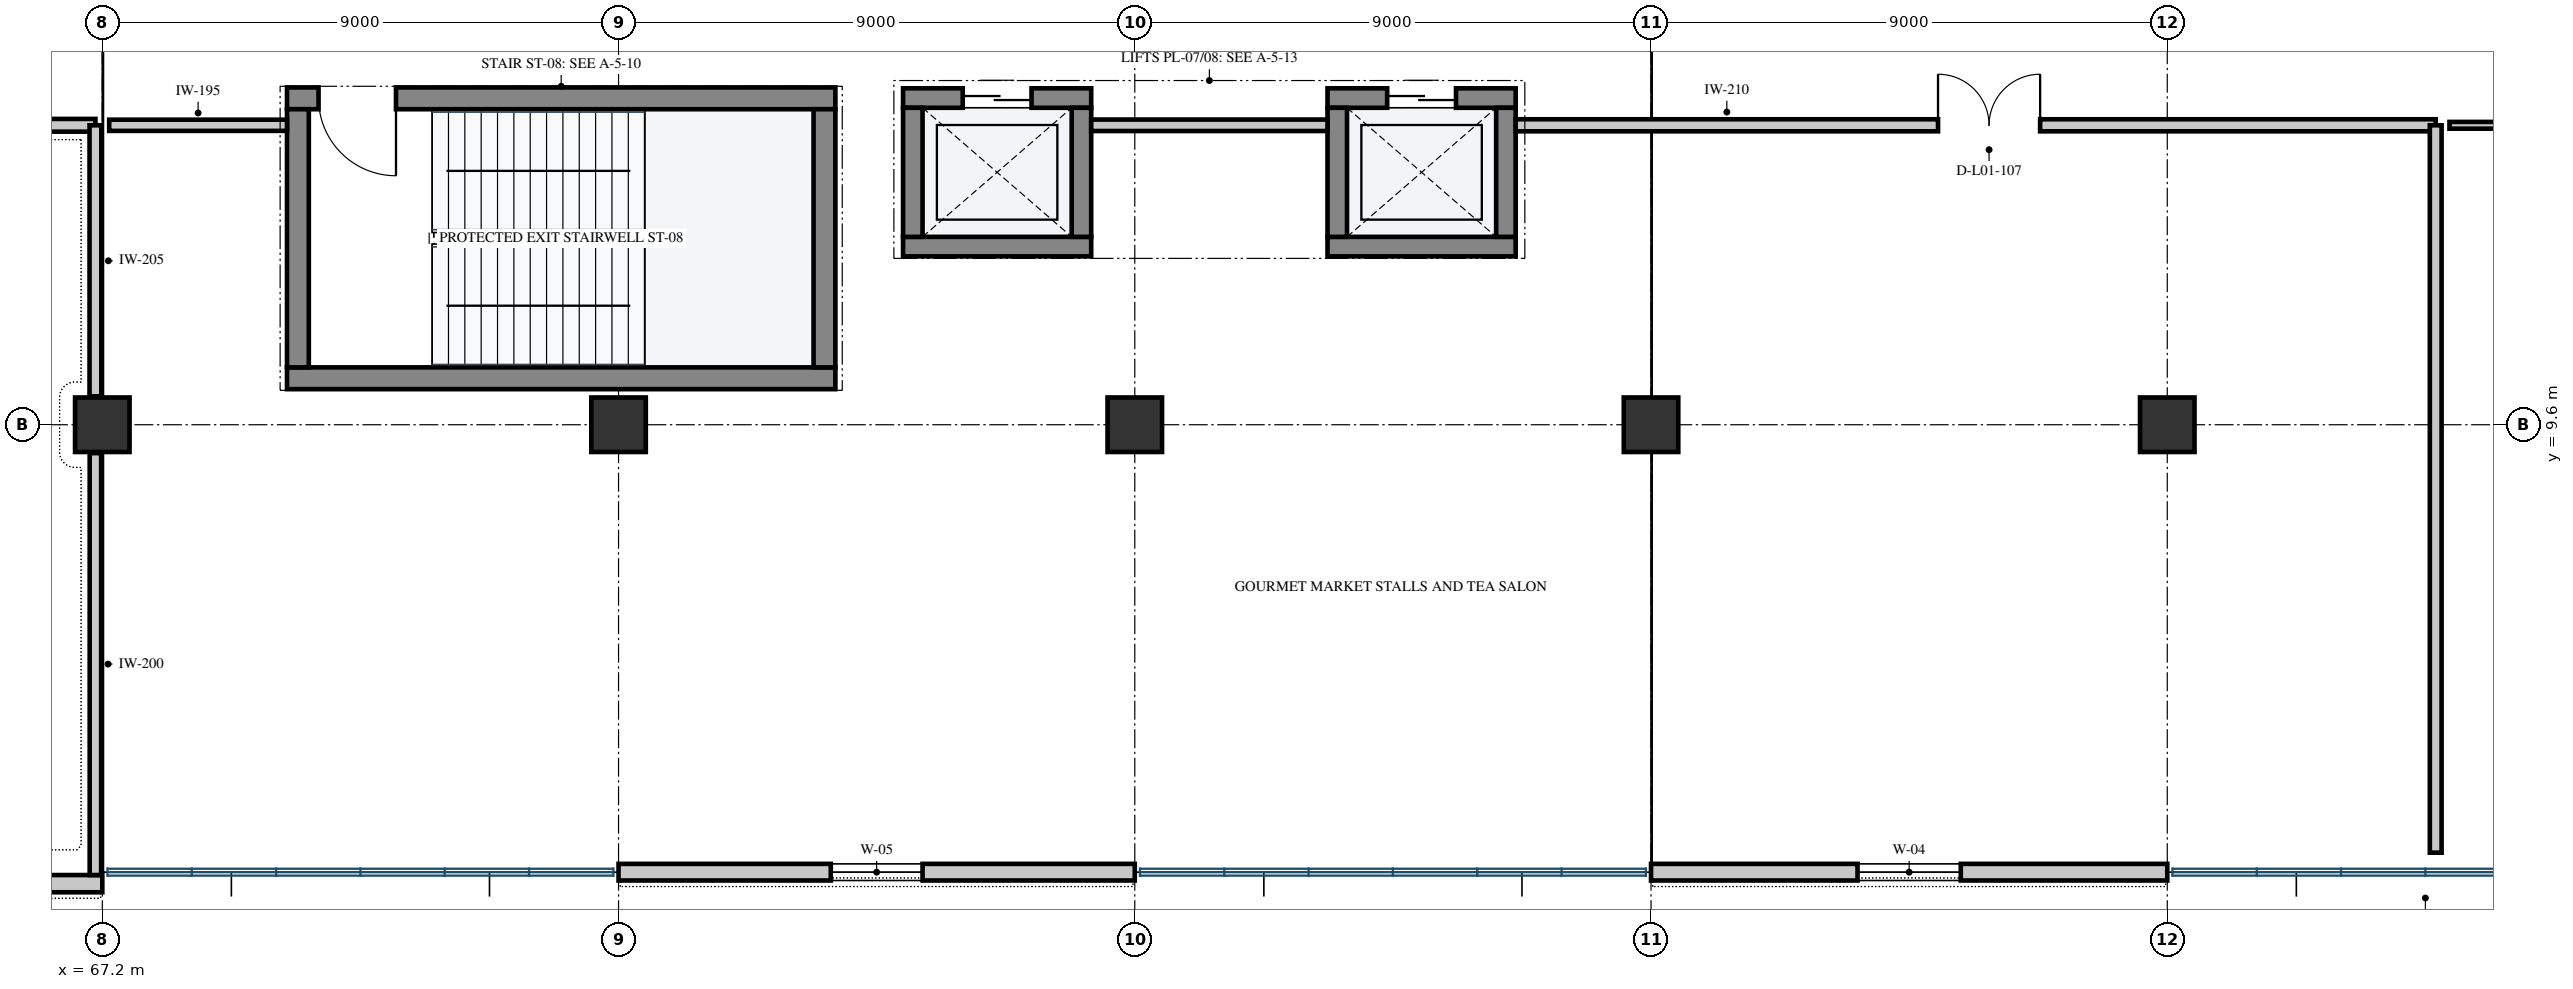
"""IFC4 building model, lengths in metres.
Left out: names, types, materials, properties, quantities, classifications, styles, units other than length and angle.
Written with IfcOpenShell. Run it as: python <this file> out.ifc"""

import sys

from ifc_helpers import new_model, si_unit, direction, frame, frame_2d, origin, origin_2d, place, context, subcontext, project, spatial, rectangle, extrude, element, fill, save


model = new_model("IFC4")
c1 = context("Model", 3, precision=1e-05, world=origin(), true_north=direction((0.0, 1.0)))
c2 = subcontext(c1, "Body", "Model", "MODEL_VIEW")
j1 = project(units=[si_unit("LENGTHUNIT", "METRE"), si_unit("PLANEANGLEUNIT", "RADIAN")], contexts=[c1])
p1 = place(None, origin())
s1 = spatial("IfcSite", under=j1, at=p1, CompositionType="ELEMENT")
p2 = place(p1, origin())
s2 = spatial("IfcBuilding", under=s1, at=p2, CompositionType="ELEMENT")
p3 = place(p2, frame((0.0, 0.0, 5.4)))
s3 = spatial("IfcBuildingStorey", under=s2, at=p3, CompositionType="ELEMENT", Elevation=5.4)
for number, where, z_axis, x_axis in (
    (1, (85.2, 9.6, 0.0), (0.0, 0.0, 1.0), (1.0, 0.0, 0.0)),
    (2, (94.2, 9.6, 0.0), (0.0, 0.0, 1.0), (1.0, 0.0, 0.0)),
    (3, (103.2, 9.6, 0.0), (0.0, 0.0, 1.0), (1.0, 0.0, 0.0)),
    (4, (67.2, 9.6, 0.0), (0.0, 0.0, 1.0), (1.0, 0.0, 0.0)),
    (5, (76.2, 9.6, 0.0), (0.0, 0.0, 1.0), (1.0, 0.0, 0.0)),
):
    element("IfcColumn", number, at=place(p3, frame(where, z_axis=z_axis, x_axis=x_axis)), inside=s3, PredefinedType="COLUMN", context=c2, shape_type="SweptSolid", body=[
        extrude(rectangle(XDim=0.95, YDim=0.95, at=origin_2d()), origin(), (0.0, 0.0, 1.0), 4.8),
    ])
p4 = place(p3, frame((103.2, 1.8, 0.0), z_axis=(0.0, 0.0, 1.0), x_axis=(-1.0, 0.0, 0.0)))
e6 = element("IfcWall", 6, at=p4, inside=s3, PredefinedType="SOLIDWALL", context=c2, shape_type="SweptSolid", body=[
    extrude(rectangle(XDim=9.0, YDim=0.29, at=frame_2d((4.5, 0.0))), origin(), (0.0, 0.0, 1.0), 4.505),
])
p5 = place(p4, frame((3.6, 0.0, 0.95)))
e7 = element("IfcOpeningElement", 7, at=p5, cuts=e6, PredefinedType="OPENING", context=c2, shape_type="SweptSolid", body=[
    extrude(rectangle(XDim=1.8, YDim=2.2, at=frame_2d((0.9, 1.1))), frame((0.0, 0.157, 0.0), z_axis=(0.0, -1.0, 0.0), x_axis=(1.0, 0.0, 0.0)), (0.0, 0.0, 1.0), 0.314),
])
p6 = place(p3, frame((85.2, 1.8, 0.0), z_axis=(0.0, 0.0, 1.0), x_axis=(-1.0, 0.0, 0.0)))
e8 = element("IfcWall", 8, at=p6, inside=s3, PredefinedType="SOLIDWALL", context=c2, shape_type="SweptSolid", body=[
    extrude(rectangle(XDim=9.0, YDim=0.29, at=frame_2d((4.5, 0.0))), origin(), (0.0, 0.0, 1.0), 4.505),
])
p7 = place(p6, frame((3.7, 0.0, 1.0)))
e9 = element("IfcOpeningElement", 9, at=p7, cuts=e8, PredefinedType="OPENING", context=c2, shape_type="SweptSolid", body=[
    extrude(rectangle(XDim=1.6, YDim=2.1, at=frame_2d((0.8, 1.05))), frame((0.0, 0.157, 0.0), z_axis=(0.0, -1.0, 0.0), x_axis=(1.0, 0.0, 0.0)), (0.0, 0.0, 1.0), 0.314),
])
p8 = place(p3, frame((67.2, 1.6, 0.0), z_axis=(0.0, 0.0, 1.0), x_axis=(-1.0, 0.0, 0.0)))
e10 = element("IfcWall", 10, at=p8, inside=s3, PredefinedType="SOLIDWALL", context=c2, shape_type="SweptSolid", body=[
    extrude(rectangle(XDim=9.6, YDim=0.3, at=frame_2d((4.8, 0.0))), origin(), (0.0, 0.0, 1.0), 4.505),
])
p9 = place(p8, frame((4.1, 0.0, 1.0)))
e11 = element("IfcOpeningElement", 11, at=p9, cuts=e10, PredefinedType="OPENING", context=c2, shape_type="SweptSolid", body=[
    extrude(rectangle(XDim=1.4, YDim=2.1, at=frame_2d((0.7, 1.05))), frame((0.0, 0.162, 0.0), z_axis=(0.0, -1.0, 0.0), x_axis=(1.0, 0.0, 0.0)), (0.0, 0.0, 1.0), 0.324),
])
p10 = place(p3, frame((70.42, 10.41, 0.0), z_axis=(0.0, 0.0, 1.0), x_axis=(1.0, 0.0, 0.0)))
e12 = element("IfcWall", 12, at=p10, inside=s3, PredefinedType="SHEAR", context=c2, shape_type="SweptSolid", body=[
    extrude(rectangle(XDim=9.56, YDim=0.38, at=frame_2d((4.78, 0.0))), origin(), (0.0, 0.0, 1.0), 4.505),
])
p11 = place(p3, frame((70.42, 15.29, 0.0), z_axis=(0.0, 0.0, 1.0), x_axis=(1.0, 0.0, 0.0)))
e13 = element("IfcWall", 13, at=p11, inside=s3, PredefinedType="SHEAR", context=c2, shape_type="SweptSolid", body=[
    extrude(rectangle(XDim=9.56, YDim=0.38, at=frame_2d((4.78, 0.0))), origin(), (0.0, 0.0, 1.0), 4.505),
])
p12 = place(p11, frame((0.55, 0.0, 0.0)))
e14 = element("IfcOpeningElement", 14, at=p12, cuts=e13, PredefinedType="OPENING", context=c2, shape_type="SweptSolid", body=[
    extrude(rectangle(XDim=1.35, YDim=2.2, at=frame_2d((0.675, 1.1))), frame((0.0, 0.202, 0.0), z_axis=(0.0, -1.0, 0.0), x_axis=(1.0, 0.0, 0.0)), (0.0, 0.0, 1.0), 0.404),
])
for number, where, z_axis, x_axis in (
    (15, (79.79, 10.6, 0.0), (0.0, 0.0, 1.0), (0.0, 1.0, 0.0)),
    (16, (70.61, 10.6, 0.0), (0.0, 0.0, 1.0), (0.0, 1.0, 0.0)),
):
    element("IfcWall", number, at=place(p3, frame(where, z_axis=z_axis, x_axis=x_axis)), inside=s3, PredefinedType="SHEAR", context=c2, shape_type="SweptSolid", body=[
        extrude(rectangle(XDim=4.5, YDim=0.38, at=frame_2d((2.25, 0.0))), origin(), (0.0, 0.0, 1.0), 4.505),
    ])
p13 = place(p3, frame((81.16, 12.705, 0.0), z_axis=(0.0, 0.0, 1.0), x_axis=(1.0, 0.0, 0.0)))
e17 = element("IfcWall", 17, at=p13, inside=s3, PredefinedType="SHEAR", context=c2, shape_type="SweptSolid", body=[
    extrude(rectangle(XDim=3.28, YDim=0.34, at=frame_2d((1.64, 0.0))), origin(), (0.0, 0.0, 1.0), 4.505),
])
p14 = place(p3, frame((81.16, 15.295, 0.0), z_axis=(0.0, 0.0, 1.0), x_axis=(1.0, 0.0, 0.0)))
e18 = element("IfcWall", 18, at=p14, inside=s3, PredefinedType="SHEAR", context=c2, shape_type="SweptSolid", body=[
    extrude(rectangle(XDim=3.28, YDim=0.34, at=frame_2d((1.64, 0.0))), origin(), (0.0, 0.0, 1.0), 4.505),
])
p15 = place(p14, frame((1.04, 0.0, 0.0)))
e19 = element("IfcOpeningElement", 19, at=p15, cuts=e18, PredefinedType="OPENING", context=c2, shape_type="SweptSolid", body=[
    extrude(rectangle(XDim=1.2, YDim=2.2, at=frame_2d((0.6, 1.1))), frame((0.0, 0.182, 0.0), z_axis=(0.0, -1.0, 0.0), x_axis=(1.0, 0.0, 0.0)), (0.0, 0.0, 1.0), 0.364),
])
for number, where, z_axis, x_axis in (
    (20, (81.33, 12.875, 0.0), (0.0, 0.0, 1.0), (0.0, 1.0, 0.0)),
    (21, (84.27, 12.875, 0.0), (0.0, 0.0, 1.0), (0.0, 1.0, 0.0)),
):
    element("IfcWall", number, at=place(p3, frame(where, z_axis=z_axis, x_axis=x_axis)), inside=s3, PredefinedType="SHEAR", context=c2, shape_type="SweptSolid", body=[
        extrude(rectangle(XDim=2.25, YDim=0.34, at=frame_2d((1.125, 0.0))), origin(), (0.0, 0.0, 1.0), 4.505),
    ])
p16 = place(p3, frame((88.56, 12.705, 0.0), z_axis=(0.0, 0.0, 1.0), x_axis=(1.0, 0.0, 0.0)))
e22 = element("IfcWall", 22, at=p16, inside=s3, PredefinedType="SHEAR", context=c2, shape_type="SweptSolid", body=[
    extrude(rectangle(XDim=3.28, YDim=0.34, at=frame_2d((1.64, 0.0))), origin(), (0.0, 0.0, 1.0), 4.505),
])
p17 = place(p3, frame((88.56, 15.295, 0.0), z_axis=(0.0, 0.0, 1.0), x_axis=(1.0, 0.0, 0.0)))
e23 = element("IfcWall", 23, at=p17, inside=s3, PredefinedType="SHEAR", context=c2, shape_type="SweptSolid", body=[
    extrude(rectangle(XDim=3.28, YDim=0.34, at=frame_2d((1.64, 0.0))), origin(), (0.0, 0.0, 1.0), 4.505),
])
p18 = place(p17, frame((1.04, 0.0, 0.0)))
e24 = element("IfcOpeningElement", 24, at=p18, cuts=e23, PredefinedType="OPENING", context=c2, shape_type="SweptSolid", body=[
    extrude(rectangle(XDim=1.2, YDim=2.2, at=frame_2d((0.6, 1.1))), frame((0.0, 0.182, 0.0), z_axis=(0.0, -1.0, 0.0), x_axis=(1.0, 0.0, 0.0)), (0.0, 0.0, 1.0), 0.364),
])
for number, where, z_axis, x_axis in (
    (25, (88.73, 12.875, 0.0), (0.0, 0.0, 1.0), (0.0, 1.0, 0.0)),
    (26, (91.67, 12.875, 0.0), (0.0, 0.0, 1.0), (0.0, 1.0, 0.0)),
):
    element("IfcWall", number, at=place(p3, frame(where, z_axis=z_axis, x_axis=x_axis)), inside=s3, PredefinedType="SHEAR", context=c2, shape_type="SweptSolid", body=[
        extrude(rectangle(XDim=2.25, YDim=0.34, at=frame_2d((1.125, 0.0))), origin(), (0.0, 0.0, 1.0), 4.505),
    ])
p19 = place(p3, frame((54.126, 14.82, 0.0), z_axis=(0.0, 0.0, 1.0), x_axis=(1.0, 0.0, 0.0)))
e27 = element("IfcWall", 27, at=p19, inside=s3, PredefinedType="PARTITIONING", context=c2, shape_type="SweptSolid", body=[
    extrude(rectangle(XDim=12.954, YDim=0.222, at=frame_2d((6.477, 0.0))), origin(), (0.0, 0.0, 1.0), 3.445),
])
p20 = place(p19, frame((6.017, 0.0, 0.0)))
e28 = element("IfcOpeningElement", 28, at=p20, cuts=e27, PredefinedType="OPENING", context=c2, shape_type="SweptSolid", body=[
    extrude(rectangle(XDim=0.92, YDim=2.1, at=frame_2d((0.46, 1.05))), frame((0.0, 0.123, 0.0), z_axis=(0.0, -1.0, 0.0), x_axis=(1.0, 0.0, 0.0)), (0.0, 0.0, 1.0), 0.246),
])
p21 = place(p3, frame((67.08, 14.82, 0.0), z_axis=(0.0, 0.0, 1.0), x_axis=(0.0, -1.0, 0.0)))
e29 = element("IfcWall", 29, at=p21, inside=s3, PredefinedType="PARTITIONING", context=c2, shape_type="SweptSolid", body=[
    extrude(rectangle(XDim=4.725, YDim=0.205, at=frame_2d((2.363, 0.0))), origin(), (0.0, 0.0, 1.0), 3.445),
])
p22 = place(p3, frame((67.08, 9.105, 0.0), z_axis=(0.0, 0.0, 1.0), x_axis=(0.0, -1.0, 0.0)))
e30 = element("IfcWall", 30, at=p22, inside=s3, PredefinedType="PARTITIONING", context=c2, shape_type="SweptSolid", body=[
    extrude(rectangle(XDim=7.355, YDim=0.2, at=frame_2d((3.677, 0.0))), origin(), (0.0, 0.0, 1.0), 4.505),
])
p23 = place(p3, frame((91.84, 14.82, 0.0), z_axis=(0.0, 0.0, 1.0), x_axis=(1.0, 0.0, 0.0)))
e31 = element("IfcWall", 31, at=p23, inside=s3, PredefinedType="PARTITIONING", context=c2, shape_type="SweptSolid", body=[
    extrude(rectangle(XDim=16.04, YDim=0.21, at=frame_2d((8.02, 0.0))), origin(), (0.0, 0.0, 1.0), 3.445),
])
p24 = place(p23, frame((7.363, 0.0, 0.0)))
e32 = element("IfcOpeningElement", 32, at=p24, cuts=e31, PredefinedType="OPENING", context=c2, shape_type="SweptSolid", body=[
    extrude(rectangle(XDim=1.78, YDim=2.32, at=frame_2d((0.89, 1.16))), frame((0.0, 0.117, 0.0), z_axis=(0.0, -1.0, 0.0), x_axis=(1.0, 0.0, 0.0)), (0.0, 0.0, 1.0), 0.234),
])
p25 = place(p3, frame((107.88, 14.82, 0.0), z_axis=(0.0, 0.0, 1.0), x_axis=(0.0, -1.0, 0.0)))
e33 = element("IfcWall", 33, at=p25, inside=s3, PredefinedType="PARTITIONING", context=c2, shape_type="SweptSolid", body=[
    extrude(rectangle(XDim=12.68, YDim=0.205, at=frame_2d((6.34, 0.0))), origin(), (0.0, 0.0, 1.0), 3.445),
])
p26 = place(p3, frame((84.44, 14.82, 0.0), z_axis=(0.0, 0.0, 1.0), x_axis=(1.0, 0.0, 0.0)))
e34 = element("IfcWall", 34, at=p26, inside=s3, PredefinedType="PARTITIONING", context=c2, shape_type="SweptSolid", body=[
    extrude(rectangle(XDim=4.12, YDim=0.2, at=frame_2d((2.06, 0.0))), origin(), (0.0, 0.0, 1.0), 3.445),
])
p27 = place(p3, frame((67.32, 14.82, 0.0), z_axis=(0.0, 0.0, 1.0), x_axis=(1.0, 0.0, 0.0)))
e35 = element("IfcWall", 35, at=p27, inside=s3, PredefinedType="PARTITIONING", context=c2, shape_type="SweptSolid", body=[
    extrude(rectangle(XDim=3.1, YDim=0.195, at=frame_2d((1.55, 0.0))), origin(), (0.0, 0.0, 1.0), 3.445),
])
p28 = place(p3, frame((108.12, 14.82, 0.0), z_axis=(0.0, 0.0, 1.0), x_axis=(1.0, 0.0, 0.0)))
e36 = element("IfcWall", 36, at=p28, inside=s3, PredefinedType="PARTITIONING", context=c2, shape_type="SweptSolid", body=[
    extrude(rectangle(XDim=26.165, YDim=0.118, at=frame_2d((13.083, 0.0))), origin(), (0.0, 0.0, 1.0), 3.445),
])
p29 = place(p28, frame((11.4, 0.0, 0.0)))
e37 = element("IfcOpeningElement", 37, at=p29, cuts=e36, PredefinedType="OPENING", context=c2, shape_type="SweptSolid", body=[
    extrude(rectangle(XDim=2.4, YDim=2.55, at=frame_2d((1.2, 1.275))), frame((0.0, 0.071, 0.0), z_axis=(0.0, -1.0, 0.0), x_axis=(1.0, 0.0, 0.0)), (0.0, 0.0, 1.0), 0.142),
])
p30 = place(p5, origin())
e38 = element("IfcWindow", 38, at=p30, inside=s3, PartitioningType="SINGLE_PANEL", PredefinedType="WINDOW", context=c2, shape_type="SweptSolid", body=[
    extrude(rectangle(XDim=1.8, YDim=2.2, at=frame_2d((0.9, 1.1))), frame((0.0, 0.03, 0.0), z_axis=(0.0, -1.0, 0.0), x_axis=(1.0, 0.0, 0.0)), (0.0, 0.0, 1.0), 0.06),
])
fill(e7, e38)
p31 = place(p7, origin())
e39 = element("IfcWindow", 39, at=p31, inside=s3, PartitioningType="SINGLE_PANEL", PredefinedType="WINDOW", context=c2, shape_type="SweptSolid", body=[
    extrude(rectangle(XDim=1.6, YDim=2.1, at=frame_2d((0.8, 1.05))), frame((0.0, 0.03, 0.0), z_axis=(0.0, -1.0, 0.0), x_axis=(1.0, 0.0, 0.0)), (0.0, 0.0, 1.0), 0.06),
])
fill(e9, e39)
p32 = place(p12, frame((1.35, 0.0, 0.0), z_axis=(0.0, 0.0, 1.0), x_axis=(-1.0, 0.0, 0.0)))
e40 = element("IfcDoor", 40, at=p32, inside=s3, OperationType="SINGLE_SWING_LEFT", PredefinedType="DOOR", context=c2, shape_type="SweptSolid", body=[
    extrude(rectangle(XDim=1.35, YDim=2.2, at=frame_2d((0.675, 1.1))), frame((0.0, 0.025, 0.0), z_axis=(0.0, -1.0, 0.0), x_axis=(1.0, 0.0, 0.0)), (0.0, 0.0, 1.0), 0.05),
])
fill(e14, e40)
p33 = place(p15, origin())
e41 = element("IfcDoor", 41, at=p33, inside=s3, OperationType="DOUBLE_DOOR_SLIDING", PredefinedType="DOOR", context=c2, shape_type="SweptSolid", body=[
    extrude(rectangle(XDim=1.2, YDim=2.2, at=frame_2d((0.6, 1.1))), frame((0.0, 0.025, 0.0), z_axis=(0.0, -1.0, 0.0), x_axis=(1.0, 0.0, 0.0)), (0.0, 0.0, 1.0), 0.05),
])
fill(e19, e41)
p34 = place(p18, origin())
e42 = element("IfcDoor", 42, at=p34, inside=s3, OperationType="DOUBLE_DOOR_SLIDING", PredefinedType="DOOR", context=c2, shape_type="SweptSolid", body=[
    extrude(rectangle(XDim=1.2, YDim=2.2, at=frame_2d((0.6, 1.1))), frame((0.0, 0.025, 0.0), z_axis=(0.0, -1.0, 0.0), x_axis=(1.0, 0.0, 0.0)), (0.0, 0.0, 1.0), 0.05),
])
fill(e24, e42)
p35 = place(p24, origin())
e43 = element("IfcDoor", 43, at=p35, inside=s3, OperationType="DOUBLE_DOOR_SINGLE_SWING", PredefinedType="DOOR", context=c2, shape_type="SweptSolid", body=[
    extrude(rectangle(XDim=1.78, YDim=2.32, at=frame_2d((0.89, 1.16))), frame((0.0, 0.025, 0.0), z_axis=(0.0, -1.0, 0.0), x_axis=(1.0, 0.0, 0.0)), (0.0, 0.0, 1.0), 0.05),
])
fill(e32, e43)
save(model, sys.argv[1])
